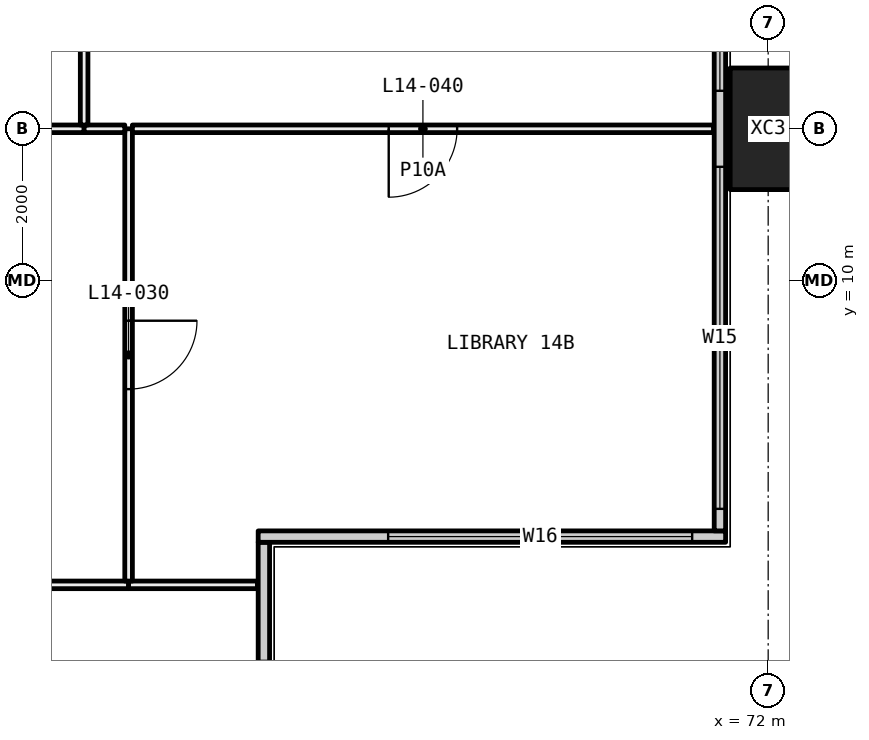
"""IFC4 building model, lengths in metres.
Left out: names, types, materials, properties, quantities, classifications, styles, units other than length and angle.
Written with IfcOpenShell. Run it as: python <this file> out.ifc"""

import sys

from ifc_helpers import new_model, si_unit, direction, frame, frame_2d, origin, origin_2d, place, context, subcontext, project, spatial, rectangle, hollow_rectangle, extrude, element, fill, save


model = new_model("IFC4")
c1 = context("Model", 3, precision=1e-05, world=origin(), true_north=direction((0.0, 1.0)))
c2 = subcontext(c1, "Body", "Model", "MODEL_VIEW")
j1 = project(units=[si_unit("LENGTHUNIT", "METRE"), si_unit("PLANEANGLEUNIT", "RADIAN")], contexts=[c1])
p1 = place(None, origin())
s1 = spatial("IfcSite", under=j1, at=p1, CompositionType="ELEMENT")
p2 = place(p1, origin())
s2 = spatial("IfcBuilding", under=s1, at=p2, CompositionType="ELEMENT")
p3 = place(p2, frame((0.0, 0.0, 61.05)))
s3 = spatial("IfcBuildingStorey", under=s2, at=p3, CompositionType="ELEMENT", Elevation=61.05)
p4 = place(p3, frame((72.0, 12.0, -0.4), z_axis=(0.0, 0.0, 1.0), x_axis=(0.0, 1.0, 0.0)))
e1 = element("IfcColumn", 1, at=p4, inside=s3, PredefinedType="COLUMN", context=c2, shape_type="SweptSolid", body=[
    extrude(hollow_rectangle(XDim=1.6, YDim=1.0, WallThickness=0.065, at=origin_2d()), origin(), (0.0, 0.0, 1.0), 3.45),
])
p5 = place(p3, frame((65.365, 0.71, 0.0), z_axis=(0.0, 0.0, 1.0), x_axis=(0.0, 1.0, 0.0)))
e2 = element("IfcWall", 2, at=p5, inside=s3, PredefinedType="ELEMENTEDWALL", context=c2, shape_type="SweptSolid", body=[
    extrude(rectangle(XDim=5.85, YDim=0.15, at=frame_2d((2.925, 0.0))), origin(), (0.0, 0.0, 1.0), 3.05),
])
p6 = place(p5, frame((0.29, 0.0, 0.45)))
e3 = element("IfcOpeningElement", 3, at=p6, cuts=e2, PredefinedType="OPENING", context=c2, shape_type="SweptSolid", body=[
    extrude(rectangle(XDim=4.0, YDim=2.55, at=frame_2d((2.0, 1.275))), frame((0.0, 0.085, 0.0), z_axis=(0.0, -1.0, 0.0), x_axis=(1.0, 0.0, 0.0)), (0.0, 0.0, 1.0), 0.17),
])
p7 = place(p3, frame((65.29, 6.635, 0.0), z_axis=(0.0, 0.0, 1.0), x_axis=(1.0, 0.0, 0.0)))
e4 = element("IfcWall", 4, at=p7, inside=s3, PredefinedType="ELEMENTEDWALL", context=c2, shape_type="SweptSolid", body=[
    extrude(rectangle(XDim=6.15, YDim=0.15, at=frame_2d((3.075, 0.0))), origin(), (0.0, 0.0, 1.0), 3.05),
])
p8 = place(p7, frame((1.71, 0.0, 0.45)))
e5 = element("IfcOpeningElement", 5, at=p8, cuts=e4, PredefinedType="OPENING", context=c2, shape_type="SweptSolid", body=[
    extrude(rectangle(XDim=4.0, YDim=2.55, at=frame_2d((2.0, 1.275))), frame((0.0, 0.085, 0.0), z_axis=(0.0, -1.0, 0.0), x_axis=(1.0, 0.0, 0.0)), (0.0, 0.0, 1.0), 0.17),
])
p9 = place(p3, frame((71.365, 6.71, 0.0), z_axis=(0.0, 0.0, 1.0), x_axis=(0.0, 1.0, 0.0)))
e6 = element("IfcWall", 6, at=p9, inside=s3, PredefinedType="ELEMENTEDWALL", context=c2, shape_type="SweptSolid", body=[
    extrude(rectangle(XDim=34.58, YDim=0.15, at=frame_2d((17.29, 0.0))), origin(), (0.0, 0.0, 1.0), 3.05),
])
p10 = place(p9, frame((0.29, 0.0, 0.45)))
e7 = element("IfcOpeningElement", 7, at=p10, cuts=e6, PredefinedType="OPENING", context=c2, shape_type="SweptSolid", body=[
    extrude(rectangle(XDim=4.5, YDim=2.55, at=frame_2d((2.25, 1.275))), frame((0.0, 0.085, 0.0), z_axis=(0.0, -1.0, 0.0), x_axis=(1.0, 0.0, 0.0)), (0.0, 0.0, 1.0), 0.17),
])
p11 = place(p9, frame((5.79, 0.0, 0.45)))
e8 = element("IfcOpeningElement", 8, at=p11, cuts=e6, PredefinedType="OPENING", context=c2, shape_type="SweptSolid", body=[
    extrude(rectangle(XDim=3.0, YDim=2.55, at=frame_2d((1.5, 1.275))), frame((0.0, 0.085, 0.0), z_axis=(0.0, -1.0, 0.0), x_axis=(1.0, 0.0, 0.0)), (0.0, 0.0, 1.0), 0.17),
])
p12 = place(p9, frame((13.79, 0.0, 0.45)))
e9 = element("IfcOpeningElement", 9, at=p12, cuts=e6, PredefinedType="OPENING", context=c2, shape_type="SweptSolid", body=[
    extrude(rectangle(XDim=3.0, YDim=2.55, at=frame_2d((1.5, 1.275))), frame((0.0, 0.085, 0.0), z_axis=(0.0, -1.0, 0.0), x_axis=(1.0, 0.0, 0.0)), (0.0, 0.0, 1.0), 0.17),
])
p13 = place(p9, frame((17.79, 0.0, 0.45)))
e10 = element("IfcOpeningElement", 10, at=p13, cuts=e6, PredefinedType="OPENING", context=c2, shape_type="SweptSolid", body=[
    extrude(rectangle(XDim=3.0, YDim=2.55, at=frame_2d((1.5, 1.275))), frame((0.0, 0.085, 0.0), z_axis=(0.0, -1.0, 0.0), x_axis=(1.0, 0.0, 0.0)), (0.0, 0.0, 1.0), 0.17),
])
p14 = place(p9, frame((26.79, 0.0, 0.45)))
e11 = element("IfcOpeningElement", 11, at=p14, cuts=e6, PredefinedType="OPENING", context=c2, shape_type="SweptSolid", body=[
    extrude(rectangle(XDim=2.0, YDim=2.55, at=frame_2d((1.0, 1.275))), frame((0.0, 0.085, 0.0), z_axis=(0.0, -1.0, 0.0), x_axis=(1.0, 0.0, 0.0)), (0.0, 0.0, 1.0), 0.17),
])
p15 = place(p9, frame((29.79, 0.0, 0.45)))
e12 = element("IfcOpeningElement", 12, at=p15, cuts=e6, PredefinedType="OPENING", context=c2, shape_type="SweptSolid", body=[
    extrude(rectangle(XDim=4.5, YDim=2.55, at=frame_2d((2.25, 1.275))), frame((0.0, 0.085, 0.0), z_axis=(0.0, -1.0, 0.0), x_axis=(1.0, 0.0, 0.0)), (0.0, 0.0, 1.0), 0.17),
])
p16 = place(p3, frame((63.585, 6.0, 0.0), z_axis=(0.0, 0.0, 1.0), x_axis=(-1.0, 0.0, 0.0)))
e13 = element("IfcWall", 13, at=p16, inside=s3, PredefinedType="PARTITIONING", context=c2, shape_type="SweptSolid", body=[
    extrude(rectangle(XDim=3.535, YDim=0.1, at=frame_2d((1.768, 0.0))), origin(), (0.0, 0.0, 1.0), 2.45),
])
p17 = place(p16, frame((1.317, 0.0, 0.0)))
e14 = element("IfcOpeningElement", 14, at=p17, cuts=e13, PredefinedType="OPENING", context=c2, shape_type="SweptSolid", body=[
    extrude(rectangle(XDim=0.9, YDim=2.1, at=frame_2d((0.45, 1.05))), frame((0.0, 0.06, 0.0), z_axis=(0.0, -1.0, 0.0), x_axis=(1.0, 0.0, 0.0)), (0.0, 0.0, 1.0), 0.12),
])
p18 = place(p3, frame((65.28, 6.0, 0.0), z_axis=(0.0, 0.0, 1.0), x_axis=(-1.0, 0.0, 0.0)))
e15 = element("IfcWall", 15, at=p18, inside=s3, PredefinedType="PARTITIONING", context=c2, shape_type="SweptSolid", body=[
    extrude(rectangle(XDim=1.695, YDim=0.1, at=frame_2d((0.848, 0.0))), origin(), (0.0, 0.0, 1.0), 3.05),
])
p19 = place(p3, frame((63.585, 6.05, 0.0), z_axis=(0.0, 0.0, 1.0), x_axis=(0.0, 1.0, 0.0)))
e16 = element("IfcWall", 16, at=p19, inside=s3, PredefinedType="PARTITIONING", context=c2, shape_type="SweptSolid", body=[
    extrude(rectangle(XDim=5.95, YDim=0.1, at=frame_2d((2.975, 0.0))), origin(), (0.0, 0.0, 1.0), 2.45),
])
p20 = place(p19, frame((2.525, 0.0, 0.0)))
e17 = element("IfcOpeningElement", 17, at=p20, cuts=e16, PredefinedType="OPENING", context=c2, shape_type="SweptSolid", body=[
    extrude(rectangle(XDim=0.9, YDim=2.1, at=frame_2d((0.45, 1.05))), frame((0.0, 0.06, 0.0), z_axis=(0.0, -1.0, 0.0), x_axis=(1.0, 0.0, 0.0)), (0.0, 0.0, 1.0), 0.12),
])
p21 = place(p3, frame((63.0, 12.0, 0.0), z_axis=(0.0, 0.0, 1.0), x_axis=(-1.0, 0.0, 0.0)))
e18 = element("IfcWall", 18, at=p21, inside=s3, PredefinedType="PARTITIONING", context=c2, shape_type="SweptSolid", body=[
    extrude(rectangle(XDim=2.2, YDim=0.1, at=frame_2d((1.1, 0.0))), origin(), (0.0, 0.0, 1.0), 2.45),
])
p22 = place(p3, frame((63.535, 12.0, 0.0), z_axis=(0.0, 0.0, 1.0), x_axis=(-1.0, 0.0, 0.0)))
e19 = element("IfcWall", 19, at=p22, inside=s3, PredefinedType="PARTITIONING", context=c2, shape_type="SweptSolid", body=[
    extrude(rectangle(XDim=0.535, YDim=0.1, at=frame_2d((0.268, 0.0))), origin(), (0.0, 0.0, 1.0), 2.45),
])
p23 = place(p3, frame((71.28, 12.0, 0.0), z_axis=(0.0, 0.0, 1.0), x_axis=(-1.0, 0.0, 0.0)))
e20 = element("IfcWall", 20, at=p23, inside=s3, PredefinedType="PARTITIONING", context=c2, shape_type="SweptSolid", body=[
    extrude(rectangle(XDim=7.645, YDim=0.1, at=frame_2d((3.823, 0.0))), origin(), (0.0, 0.0, 1.0), 2.45),
])
p24 = place(p23, frame((3.373, 0.0, 0.0)))
e21 = element("IfcOpeningElement", 21, at=p24, cuts=e20, PredefinedType="OPENING", context=c2, shape_type="SweptSolid", body=[
    extrude(rectangle(XDim=0.9, YDim=2.1, at=frame_2d((0.45, 1.05))), frame((0.0, 0.06, 0.0), z_axis=(0.0, -1.0, 0.0), x_axis=(1.0, 0.0, 0.0)), (0.0, 0.0, 1.0), 0.12),
])
p25 = place(p3, frame((63.0, 12.05, 0.0), z_axis=(0.0, 0.0, 1.0), x_axis=(0.0, 1.0, 0.0)))
e22 = element("IfcWall", 22, at=p25, inside=s3, PredefinedType="PARTITIONING", context=c2, shape_type="SweptSolid", body=[
    extrude(rectangle(XDim=5.85, YDim=0.1, at=frame_2d((2.925, 0.0))), origin(), (0.0, 0.0, 1.0), 2.45),
])
p26 = place(p8, origin())
e23 = element("IfcWindow", 23, at=p26, inside=s3, PartitioningType="SINGLE_PANEL", PredefinedType="WINDOW", context=c2, shape_type="SweptSolid", body=[
    extrude(rectangle(XDim=4.0, YDim=2.55, at=frame_2d((2.0, 1.275))), frame((0.0, 0.03, 0.0), z_axis=(0.0, -1.0, 0.0), x_axis=(1.0, 0.0, 0.0)), (0.0, 0.0, 1.0), 0.06),
])
fill(e5, e23)
p27 = place(p10, origin())
e24 = element("IfcWindow", 24, at=p27, inside=s3, PartitioningType="SINGLE_PANEL", PredefinedType="WINDOW", context=c2, shape_type="SweptSolid", body=[
    extrude(rectangle(XDim=4.5, YDim=2.55, at=frame_2d((2.25, 1.275))), frame((0.0, 0.03, 0.0), z_axis=(0.0, -1.0, 0.0), x_axis=(1.0, 0.0, 0.0)), (0.0, 0.0, 1.0), 0.06),
])
fill(e7, e24)
p28 = place(p11, origin())
e25 = element("IfcWindow", 25, at=p28, inside=s3, PartitioningType="SINGLE_PANEL", PredefinedType="WINDOW", context=c2, shape_type="SweptSolid", body=[
    extrude(rectangle(XDim=3.0, YDim=2.55, at=frame_2d((1.5, 1.275))), frame((0.0, 0.03, 0.0), z_axis=(0.0, -1.0, 0.0), x_axis=(1.0, 0.0, 0.0)), (0.0, 0.0, 1.0), 0.06),
])
fill(e8, e25)
p29 = place(p20, frame((0.9, 0.0, 0.0), x_axis=(-1.0, 0.0, 0.0)))
e26 = element("IfcDoor", 26, at=p29, inside=s3, OperationType="SINGLE_SWING_RIGHT", PredefinedType="DOOR", context=c2, shape_type="SweptSolid", body=[
    extrude(rectangle(XDim=0.9, YDim=2.1, at=frame_2d((0.45, 1.05))), frame((0.0, 0.025, 0.0), z_axis=(0.0, -1.0, 0.0), x_axis=(1.0, 0.0, 0.0)), (0.0, 0.0, 1.0), 0.05),
])
fill(e17, e26)
p30 = place(p24, origin())
e27 = element("IfcDoor", 27, at=p30, inside=s3, OperationType="SINGLE_SWING_LEFT", PredefinedType="DOOR", context=c2, shape_type="SweptSolid", body=[
    extrude(rectangle(XDim=0.9, YDim=2.1, at=frame_2d((0.45, 1.05))), frame((0.0, 0.025, 0.0), z_axis=(0.0, -1.0, 0.0), x_axis=(1.0, 0.0, 0.0)), (0.0, 0.0, 1.0), 0.05),
])
fill(e21, e27)
save(model, sys.argv[1])
